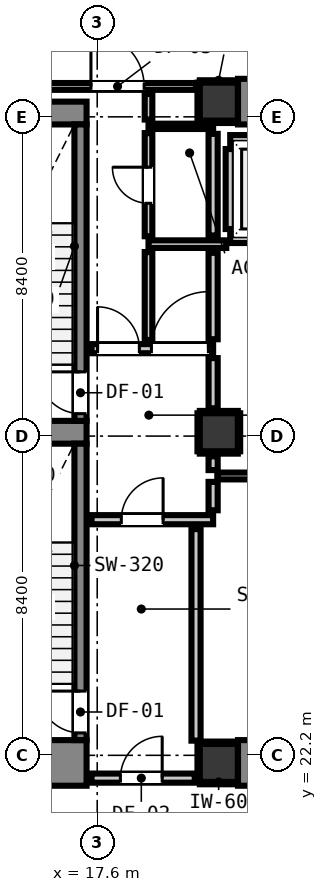
"""IFC4 building model, lengths in metres.
Left out: names, types, materials, properties, quantities, classifications, styles, units other than length and angle.
Written with IfcOpenShell. Run it as: python <this file> out.ifc"""

import sys

from ifc_helpers import new_model, si_unit, direction, frame, frame_2d, origin, origin_2d, place, context, subcontext, project, spatial, rectangle, extrude, element, fill, save


model = new_model("IFC4")
c1 = context("Model", 3, precision=1e-05, world=origin(), true_north=direction((0.0, 1.0)))
c2 = subcontext(c1, "Body", "Model", "MODEL_VIEW")
j1 = project(units=[si_unit("LENGTHUNIT", "METRE"), si_unit("PLANEANGLEUNIT", "RADIAN")], contexts=[c1])
p1 = place(None, origin())
s1 = spatial("IfcSite", under=j1, at=p1, CompositionType="ELEMENT")
p2 = place(p1, origin())
s2 = spatial("IfcBuilding", under=s1, at=p2, CompositionType="ELEMENT")
p3 = place(p2, frame((0.0, 0.0, -4.4)))
s3 = spatial("IfcBuildingStorey", under=s2, at=p3, CompositionType="ELEMENT", Elevation=-4.4)
for number, where, z_axis, x_axis in (
    (1, (20.8, 22.0, 0.0), (0.0, 0.0, 1.0), (1.0, 0.0, 0.0)),
    (2, (20.8, 39.4, 0.0), (0.0, 0.0, 1.0), (1.0, 0.0, 0.0)),
):
    element("IfcColumn", number, at=place(p3, frame(where, z_axis=z_axis, x_axis=x_axis)), inside=s3, PredefinedType="COLUMN", context=c2, shape_type="SweptSolid", body=[
        extrude(rectangle(XDim=1.0, YDim=1.0, at=origin_2d()), origin(), (0.0, 0.0, 1.0), 4.4),
    ])
p4 = place(p3, frame((13.24, 22.0, 0.0), z_axis=(0.0, 0.0, 1.0), x_axis=(1.0, 0.0, 0.0)))
e3 = element("IfcWall", 3, at=p4, inside=s3, PredefinedType="SHEAR", context=c2, shape_type="SweptSolid", body=[
    extrude(rectangle(XDim=4.08, YDim=1.2, at=frame_2d((2.04, 0.0))), origin(), (0.0, 0.0, 1.0), 4.4),
])
p5 = place(p3, frame((13.24, 39.1, 0.0), z_axis=(0.0, 0.0, 1.0), x_axis=(1.0, 0.0, 0.0)))
e4 = element("IfcWall", 4, at=p5, inside=s3, PredefinedType="SHEAR", context=c2, shape_type="SweptSolid", body=[
    extrude(rectangle(XDim=4.08, YDim=0.6, at=frame_2d((2.04, 0.0))), origin(), (0.0, 0.0, 1.0), 4.4),
])
p6 = place(p3, frame((13.905, 30.7, 0.0), z_axis=(0.0, 0.0, 1.0), x_axis=(1.0, 0.0, 0.0)))
e5 = element("IfcWall", 5, at=p6, inside=s3, PredefinedType="SHEAR", context=c2, shape_type="SweptSolid", body=[
    extrude(rectangle(XDim=3.415, YDim=0.6, at=frame_2d((1.708, 0.0))), origin(), (0.0, 0.0, 1.0), 4.4),
])
for number, where, z_axis, x_axis in (
    (6, (21.305, 22.0, 0.0), (0.0, 0.0, 1.0), (1.0, 0.0, 0.0)),
    (7, (21.305, 39.4, 0.0), (0.0, 0.0, 1.0), (1.0, 0.0, 0.0)),
):
    element("IfcWall", number, at=place(p3, frame(where, z_axis=z_axis, x_axis=x_axis)), inside=s3, PredefinedType="SHEAR", context=c2, shape_type="SweptSolid", body=[
        extrude(rectangle(XDim=7.39, YDim=1.2, at=frame_2d((3.695, 0.0))), origin(), (0.0, 0.0, 1.0), 4.4),
    ])
p7 = place(p3, frame((17.16, 31.0, 0.0), z_axis=(0.0, 0.0, 1.0), x_axis=(0.0, 1.0, 0.0)))
e8 = element("IfcWall", 8, at=p7, inside=s3, PredefinedType="SHEAR", context=c2, shape_type="SweptSolid", body=[
    extrude(rectangle(XDim=7.8, YDim=0.32, at=frame_2d((3.9, 0.0))), origin(), (0.0, 0.0, 1.0), 4.4),
])
p8 = place(p7, frame((0.19, 0.0, 0.0)))
e9 = element("IfcOpeningElement", 9, at=p8, cuts=e8, PredefinedType="OPENING", context=c2, shape_type="SweptSolid", body=[
    extrude(rectangle(XDim=1.1, YDim=2.15, at=frame_2d((0.55, 1.075))), frame((0.0, 0.17, 0.0), z_axis=(0.0, -1.0, 0.0), x_axis=(1.0, 0.0, 0.0)), (0.0, 0.0, 1.0), 0.34),
])
p9 = place(p3, frame((17.16, 22.6, 0.0), z_axis=(0.0, 0.0, 1.0), x_axis=(0.0, 1.0, 0.0)))
e10 = element("IfcWall", 10, at=p9, inside=s3, PredefinedType="SHEAR", context=c2, shape_type="SweptSolid", body=[
    extrude(rectangle(XDim=7.8, YDim=0.32, at=frame_2d((3.9, 0.0))), origin(), (0.0, 0.0, 1.0), 4.4),
])
p10 = place(p9, frame((0.19, 0.0, 0.0)))
e11 = element("IfcOpeningElement", 11, at=p10, cuts=e10, PredefinedType="OPENING", context=c2, shape_type="SweptSolid", body=[
    extrude(rectangle(XDim=1.1, YDim=2.15, at=frame_2d((0.55, 1.075))), frame((0.0, 0.17, 0.0), z_axis=(0.0, -1.0, 0.0), x_axis=(1.0, 0.0, 0.0)), (0.0, 0.0, 1.0), 0.34),
])
p11 = place(p3, frame((20.8, 30.7, 0.0), z_axis=(0.0, 0.0, 1.0), x_axis=(1.0, 0.0, 0.0)))
e12 = element("IfcColumn", 12, at=p11, inside=s3, PredefinedType="COLUMN", context=c2, shape_type="SweptSolid", body=[
    extrude(rectangle(XDim=1.0, YDim=1.0, at=origin_2d()), origin(), (0.0, 0.0, 1.0), 4.4),
])
for number, where, z_axis, x_axis in (
    (13, (21.1, 35.8, 0.0), (0.0, 0.0, 1.0), (1.0, 0.0, 0.0)),
    (14, (21.1, 38.4, 0.0), (0.0, 0.0, 1.0), (1.0, 0.0, 0.0)),
):
    element("IfcWall", number, at=place(p3, frame(where, z_axis=z_axis, x_axis=x_axis)), inside=s3, PredefinedType="PARTITIONING", context=c2, shape_type="SweptSolid", body=[
        extrude(rectangle(XDim=2.2, YDim=0.24, at=frame_2d((1.1, 0.0))), origin(), (0.0, 0.0, 1.0), 3.98),
    ])
p12 = place(p3, frame((21.1, 36.048, 0.0), z_axis=(0.0, 0.0, 1.0), x_axis=(0.0, 1.0, 0.0)))
e15 = element("IfcWall", 15, at=p12, inside=s3, PredefinedType="PARTITIONING", context=c2, shape_type="SweptSolid", body=[
    extrude(rectangle(XDim=2.104, YDim=0.24, at=frame_2d((1.052, 0.0))), origin(), (0.0, 0.0, 1.0), 3.015),
])
p13 = place(p3, frame((17.45, 21.6, 0.0), z_axis=(0.0, 0.0, 1.0), x_axis=(1.0, 0.0, 0.0)))
e16 = element("IfcWall", 16, at=p13, inside=s3, PredefinedType="PARTITIONING", context=c2, shape_type="SweptSolid", body=[
    extrude(rectangle(XDim=2.718, YDim=0.24, at=frame_2d((1.359, 0.0))), origin(), (0.0, 0.0, 1.0), 3.215),
])
p14 = place(p13, frame((0.76, 0.0, 0.0)))
e17 = element("IfcOpeningElement", 17, at=p14, cuts=e16, PredefinedType="OPENING", context=c2, shape_type="SweptSolid", body=[
    extrude(rectangle(XDim=1.1, YDim=2.15, at=frame_2d((0.55, 1.075))), frame((0.0, 0.13, 0.0), z_axis=(0.0, -1.0, 0.0), x_axis=(1.0, 0.0, 0.0)), (0.0, 0.0, 1.0), 0.26),
])
p15 = place(p3, frame((17.45, 28.4, 0.0), z_axis=(0.0, 0.0, 1.0), x_axis=(1.0, 0.0, 0.0)))
e18 = element("IfcWall", 18, at=p15, inside=s3, PredefinedType="PARTITIONING", context=c2, shape_type="SweptSolid", body=[
    extrude(rectangle(XDim=3.2, YDim=0.24, at=frame_2d((1.6, 0.0))), origin(), (0.0, 0.0, 1.0), 3.98),
])
p16 = place(p15, frame((0.784, 0.0, 0.0)))
e19 = element("IfcOpeningElement", 19, at=p16, cuts=e18, PredefinedType="OPENING", context=c2, shape_type="SweptSolid", body=[
    extrude(rectangle(XDim=1.1, YDim=2.15, at=frame_2d((0.55, 1.075))), frame((0.0, 0.13, 0.0), z_axis=(0.0, -1.0, 0.0), x_axis=(1.0, 0.0, 0.0)), (0.0, 0.0, 1.0), 0.26),
])
p17 = place(p3, frame((17.45, 32.9, 0.0), z_axis=(0.0, 0.0, 1.0), x_axis=(1.0, 0.0, 0.0)))
e20 = element("IfcWall", 20, at=p17, inside=s3, PredefinedType="PARTITIONING", context=c2, shape_type="SweptSolid", body=[
    extrude(rectangle(XDim=3.2, YDim=0.24, at=frame_2d((1.6, 0.0))), origin(), (0.0, 0.0, 1.0), 3.98),
])
p18 = place(p17, frame((0.159, 0.0, 0.0)))
e21 = element("IfcOpeningElement", 21, at=p18, cuts=e20, PredefinedType="OPENING", context=c2, shape_type="SweptSolid", body=[
    extrude(rectangle(XDim=1.1, YDim=2.15, at=frame_2d((0.55, 1.075))), frame((0.0, 0.13, 0.0), z_axis=(0.0, -1.0, 0.0), x_axis=(1.0, 0.0, 0.0)), (0.0, 0.0, 1.0), 0.26),
])
p19 = place(p17, frame((1.576, 0.0, 0.0)))
e22 = element("IfcOpeningElement", 22, at=p19, cuts=e20, PredefinedType="OPENING", context=c2, shape_type="SweptSolid", body=[
    extrude(rectangle(XDim=1.5, YDim=2.15, at=frame_2d((0.75, 1.075))), frame((0.0, 0.13, 0.0), z_axis=(0.0, -1.0, 0.0), x_axis=(1.0, 0.0, 0.0)), (0.0, 0.0, 1.0), 0.26),
])
p20 = place(p3, frame((18.95, 35.65, 0.0), z_axis=(0.0, 0.0, 1.0), x_axis=(1.0, 0.0, 0.0)))
e23 = element("IfcWall", 23, at=p20, inside=s3, PredefinedType="PARTITIONING", context=c2, shape_type="SweptSolid", body=[
    extrude(rectangle(XDim=2.046, YDim=0.2, at=frame_2d((1.023, 0.0))), origin(), (0.0, 0.0, 1.0), 3.98),
])
p21 = place(p3, frame((20.76, 29.55, 0.0), z_axis=(0.0, 0.0, 1.0), x_axis=(1.0, 0.0, 0.0)))
e24 = element("IfcWall", 24, at=p21, inside=s3, PredefinedType="PARTITIONING", context=c2, shape_type="SweptSolid", body=[
    extrude(rectangle(XDim=8.48, YDim=0.18, at=frame_2d((4.24, 0.0))), origin(), (0.0, 0.0, 1.0), 3.015),
])
p22 = place(p3, frame((10.4, 39.8, 0.0), z_axis=(0.0, 0.0, 1.0), x_axis=(1.0, 0.0, 0.0)))
e25 = element("IfcWall", 25, at=p22, inside=s3, PredefinedType="PARTITIONING", context=c2, shape_type="SweptSolid", body=[
    extrude(rectangle(XDim=9.798, YDim=0.18, at=frame_2d((4.899, 0.0))), origin(), (0.0, 0.0, 1.0), 3.215),
])
p23 = place(p22, frame((7.035, 0.0, 0.0)))
e26 = element("IfcOpeningElement", 26, at=p23, cuts=e25, PredefinedType="OPENING", context=c2, shape_type="SweptSolid", body=[
    extrude(rectangle(XDim=1.4, YDim=2.15, at=frame_2d((0.7, 1.075))), frame((0.0, 0.1, 0.0), z_axis=(0.0, -1.0, 0.0), x_axis=(1.0, 0.0, 0.0)), (0.0, 0.0, 1.0), 0.2),
])
p24 = place(p22, frame((0.424, 0.0, 0.0)))
e27 = element("IfcOpeningElement", 27, at=p24, cuts=e25, PredefinedType="OPENING", context=c2, shape_type="SweptSolid", body=[
    extrude(rectangle(XDim=1.4, YDim=2.15, at=frame_2d((0.7, 1.075))), frame((0.0, 0.1, 0.0), z_axis=(0.0, -1.0, 0.0), x_axis=(1.0, 0.0, 0.0)), (0.0, 0.0, 1.0), 0.2),
])
p25 = place(p3, frame((18.95, 38.75, 0.0), z_axis=(0.0, 0.0, 1.0), x_axis=(1.0, 0.0, 0.0)))
e28 = element("IfcWall", 28, at=p25, inside=s3, PredefinedType="PARTITIONING", context=c2, shape_type="SweptSolid", body=[
    extrude(rectangle(XDim=1.7, YDim=0.14, at=frame_2d((0.85, 0.0))), origin(), (0.0, 0.0, 1.0), 3.98),
])
p26 = place(p3, frame((20.2, 22.586, 0.0), z_axis=(0.0, 0.0, 1.0), x_axis=(0.0, 1.0, 0.0)))
e29 = element("IfcWall", 29, at=p26, inside=s3, PredefinedType="PARTITIONING", context=c2, shape_type="SweptSolid", body=[
    extrude(rectangle(XDim=5.566, YDim=0.24, at=frame_2d((2.783, 0.0))), origin(), (0.0, 0.0, 1.0), 3.98),
])
p27 = place(p3, frame((20.65, 28.648, 0.0), z_axis=(0.0, 0.0, 1.0), x_axis=(0.0, 1.0, 0.0)))
e30 = element("IfcWall", 30, at=p27, inside=s3, PredefinedType="PARTITIONING", context=c2, shape_type="SweptSolid", body=[
    extrude(rectangle(XDim=0.747, YDim=0.24, at=frame_2d((0.374, 0.0))), origin(), (0.0, 0.0, 1.0), 3.015),
])
p28 = place(p3, frame((20.65, 29.705, 0.0), z_axis=(0.0, 0.0, 1.0), x_axis=(0.0, 1.0, 0.0)))
e31 = element("IfcWall", 31, at=p28, inside=s3, PredefinedType="PARTITIONING", context=c2, shape_type="SweptSolid", body=[
    extrude(rectangle(XDim=0.363, YDim=0.24, at=frame_2d((0.182, 0.0))), origin(), (0.0, 0.0, 1.0), 3.015),
])
p29 = place(p3, frame((20.65, 31.332, 0.0), z_axis=(0.0, 0.0, 1.0), x_axis=(0.0, 1.0, 0.0)))
e32 = element("IfcWall", 32, at=p29, inside=s3, PredefinedType="PARTITIONING", context=c2, shape_type="SweptSolid", body=[
    extrude(rectangle(XDim=1.32, YDim=0.24, at=frame_2d((0.66, 0.0))), origin(), (0.0, 0.0, 1.0), 3.015),
])
p30 = place(p3, frame((20.65, 33.148, 0.0), z_axis=(0.0, 0.0, 1.0), x_axis=(0.0, 1.0, 0.0)))
e33 = element("IfcWall", 33, at=p30, inside=s3, PredefinedType="PARTITIONING", context=c2, shape_type="SweptSolid", body=[
    extrude(rectangle(XDim=2.274, YDim=0.24, at=frame_2d((1.137, 0.0))), origin(), (0.0, 0.0, 1.0), 3.015),
])
p31 = place(p3, frame((20.65, 35.878, 0.0), z_axis=(0.0, 0.0, 1.0), x_axis=(0.0, 1.0, 0.0)))
e34 = element("IfcWall", 34, at=p31, inside=s3, PredefinedType="PARTITIONING", context=c2, shape_type="SweptSolid", body=[
    extrude(rectangle(XDim=2.674, YDim=0.24, at=frame_2d((1.337, 0.0))), origin(), (0.0, 0.0, 1.0), 3.015),
])
p32 = place(p3, frame((18.95, 33.128, 0.0), z_axis=(0.0, 0.0, 1.0), x_axis=(0.0, 1.0, 0.0)))
e35 = element("IfcWall", 35, at=p32, inside=s3, PredefinedType="PARTITIONING", context=c2, shape_type="SweptSolid", body=[
    extrude(rectangle(XDim=2.314, YDim=0.2, at=frame_2d((1.157, 0.0))), origin(), (0.0, 0.0, 1.0), 3.98),
])
p33 = place(p3, frame((18.95, 35.858, 0.0), z_axis=(0.0, 0.0, 1.0), x_axis=(0.0, 1.0, 0.0)))
e36 = element("IfcWall", 36, at=p33, inside=s3, PredefinedType="PARTITIONING", context=c2, shape_type="SweptSolid", body=[
    extrude(rectangle(XDim=2.714, YDim=0.2, at=frame_2d((1.357, 0.0))), origin(), (0.0, 0.0, 1.0), 3.98),
])
p34 = place(p33, frame((0.867, 0.0, 0.0)))
e37 = element("IfcOpeningElement", 37, at=p34, cuts=e36, PredefinedType="OPENING", context=c2, shape_type="SweptSolid", body=[
    extrude(rectangle(XDim=0.95, YDim=2.1, at=frame_2d((0.475, 1.05))), frame((0.0, 0.11, 0.0), z_axis=(0.0, -1.0, 0.0), x_axis=(1.0, 0.0, 0.0)), (0.0, 0.0, 1.0), 0.22),
])
p35 = place(p3, frame((18.95, 38.928, 0.0), z_axis=(0.0, 0.0, 1.0), x_axis=(0.0, 1.0, 0.0)))
e38 = element("IfcWall", 38, at=p35, inside=s3, PredefinedType="PARTITIONING", context=c2, shape_type="SweptSolid", body=[
    extrude(rectangle(XDim=0.674, YDim=0.2, at=frame_2d((0.337, 0.0))), origin(), (0.0, 0.0, 1.0), 3.98),
])
for number, where, z_axis, x_axis in (
    (39, (20.3, 21.468, 0.0), (0.0, 0.0, 1.0), (1.0, 0.0, 0.0)),
    (40, (20.3, 22.532, 0.0), (0.0, 0.0, 1.0), (1.0, 0.0, 0.0)),
):
    element("IfcWall", number, at=place(p3, frame(where, z_axis=z_axis, x_axis=x_axis)), inside=s3, PredefinedType="PARTITIONING", context=c2, shape_type="SweptSolid", body=[
        extrude(rectangle(XDim=0.99, YDim=0.06, at=frame_2d((0.495, 0.0))), origin(), (0.0, 0.0, 1.0), 1.45),
    ])
p36 = place(p3, frame((20.268, 21.5, 0.0), z_axis=(0.0, 0.0, 1.0), x_axis=(0.0, 1.0, 0.0)))
e41 = element("IfcWall", 41, at=p36, inside=s3, PredefinedType="PARTITIONING", context=c2, shape_type="SweptSolid", body=[
    extrude(rectangle(XDim=1.0, YDim=0.06, at=frame_2d((0.5, 0.0))), origin(), (0.0, 0.0, 1.0), 1.45),
])
for number, where, z_axis, x_axis in (
    (42, (20.3, 38.868, 0.0), (0.0, 0.0, 1.0), (1.0, 0.0, 0.0)),
    (43, (20.3, 39.932, 0.0), (0.0, 0.0, 1.0), (1.0, 0.0, 0.0)),
):
    element("IfcWall", number, at=place(p3, frame(where, z_axis=z_axis, x_axis=x_axis)), inside=s3, PredefinedType="PARTITIONING", context=c2, shape_type="SweptSolid", body=[
        extrude(rectangle(XDim=0.99, YDim=0.06, at=frame_2d((0.495, 0.0))), origin(), (0.0, 0.0, 1.0), 1.45),
    ])
for number, where, z_axis, x_axis in (
    (44, (20.268, 38.9, 0.0), (0.0, 0.0, 1.0), (0.0, 1.0, 0.0)),
    (45, (20.3, 30.168, 0.0), (0.0, 0.0, 1.0), (1.0, 0.0, 0.0)),
    (46, (20.3, 31.232, 0.0), (0.0, 0.0, 1.0), (1.0, 0.0, 0.0)),
    (47, (20.268, 30.2, 0.0), (0.0, 0.0, 1.0), (0.0, 1.0, 0.0)),
    (48, (21.332, 30.2, 0.0), (0.0, 0.0, 1.0), (0.0, 1.0, 0.0)),
):
    element("IfcWall", number, at=place(p3, frame(where, z_axis=z_axis, x_axis=x_axis)), inside=s3, PredefinedType="PARTITIONING", context=c2, shape_type="SweptSolid", body=[
        extrude(rectangle(XDim=1.0, YDim=0.06, at=frame_2d((0.5, 0.0))), origin(), (0.0, 0.0, 1.0), 1.45),
    ])
p37 = place(p8, origin())
e49 = element("IfcDoor", 49, at=p37, inside=s3, OperationType="SINGLE_SWING_RIGHT", PredefinedType="DOOR", context=c2, shape_type="SweptSolid", body=[
    extrude(rectangle(XDim=1.1, YDim=2.15, at=frame_2d((0.55, 1.075))), frame((0.0, 0.025, 0.0), z_axis=(0.0, -1.0, 0.0), x_axis=(1.0, 0.0, 0.0)), (0.0, 0.0, 1.0), 0.05),
])
fill(e9, e49)
p38 = place(p10, origin())
e50 = element("IfcDoor", 50, at=p38, inside=s3, OperationType="SINGLE_SWING_RIGHT", PredefinedType="DOOR", context=c2, shape_type="SweptSolid", body=[
    extrude(rectangle(XDim=1.1, YDim=2.15, at=frame_2d((0.55, 1.075))), frame((0.0, 0.025, 0.0), z_axis=(0.0, -1.0, 0.0), x_axis=(1.0, 0.0, 0.0)), (0.0, 0.0, 1.0), 0.05),
])
fill(e11, e50)
p39 = place(p16, origin())
e51 = element("IfcDoor", 51, at=p39, inside=s3, OperationType="SINGLE_SWING_RIGHT", PredefinedType="DOOR", context=c2, shape_type="SweptSolid", body=[
    extrude(rectangle(XDim=1.1, YDim=2.15, at=frame_2d((0.55, 1.075))), frame((0.0, 0.025, 0.0), z_axis=(0.0, -1.0, 0.0), x_axis=(1.0, 0.0, 0.0)), (0.0, 0.0, 1.0), 0.05),
])
fill(e19, e51)
p40 = place(p18, origin())
e52 = element("IfcDoor", 52, at=p40, inside=s3, OperationType="SINGLE_SWING_LEFT", PredefinedType="DOOR", context=c2, shape_type="SweptSolid", body=[
    extrude(rectangle(XDim=1.1, YDim=2.15, at=frame_2d((0.55, 1.075))), frame((0.0, 0.025, 0.0), z_axis=(0.0, -1.0, 0.0), x_axis=(1.0, 0.0, 0.0)), (0.0, 0.0, 1.0), 0.05),
])
fill(e21, e52)
p41 = place(p14, origin())
e53 = element("IfcDoor", 53, at=p41, inside=s3, OperationType="SINGLE_SWING_RIGHT", PredefinedType="DOOR", context=c2, shape_type="SweptSolid", body=[
    extrude(rectangle(XDim=1.1, YDim=2.15, at=frame_2d((0.55, 1.075))), frame((0.0, 0.025, 0.0), z_axis=(0.0, -1.0, 0.0), x_axis=(1.0, 0.0, 0.0)), (0.0, 0.0, 1.0), 0.05),
])
fill(e17, e53)
p42 = place(p23, origin())
e54 = element("IfcDoor", 54, at=p42, inside=s3, OperationType="SINGLE_SWING_LEFT", PredefinedType="DOOR", context=c2, shape_type="SweptSolid", body=[
    extrude(rectangle(XDim=1.4, YDim=2.15, at=frame_2d((0.7, 1.075))), frame((0.0, 0.025, 0.0), z_axis=(0.0, -1.0, 0.0), x_axis=(1.0, 0.0, 0.0)), (0.0, 0.0, 1.0), 0.05),
])
fill(e26, e54)
p43 = place(p19, origin())
e55 = element("IfcDoor", 55, at=p43, inside=s3, OperationType="SINGLE_SWING_RIGHT", PredefinedType="DOOR", context=c2, shape_type="SweptSolid", body=[
    extrude(rectangle(XDim=1.5, YDim=2.15, at=frame_2d((0.75, 1.075))), frame((0.0, 0.025, 0.0), z_axis=(0.0, -1.0, 0.0), x_axis=(1.0, 0.0, 0.0)), (0.0, 0.0, 1.0), 0.05),
])
fill(e22, e55)
p44 = place(p34, origin())
e56 = element("IfcDoor", 56, at=p44, inside=s3, OperationType="SINGLE_SWING_RIGHT", PredefinedType="DOOR", context=c2, shape_type="SweptSolid", body=[
    extrude(rectangle(XDim=0.95, YDim=2.1, at=frame_2d((0.475, 1.05))), frame((0.0, 0.025, 0.0), z_axis=(0.0, -1.0, 0.0), x_axis=(1.0, 0.0, 0.0)), (0.0, 0.0, 1.0), 0.05),
])
fill(e37, e56)
save(model, sys.argv[1])
